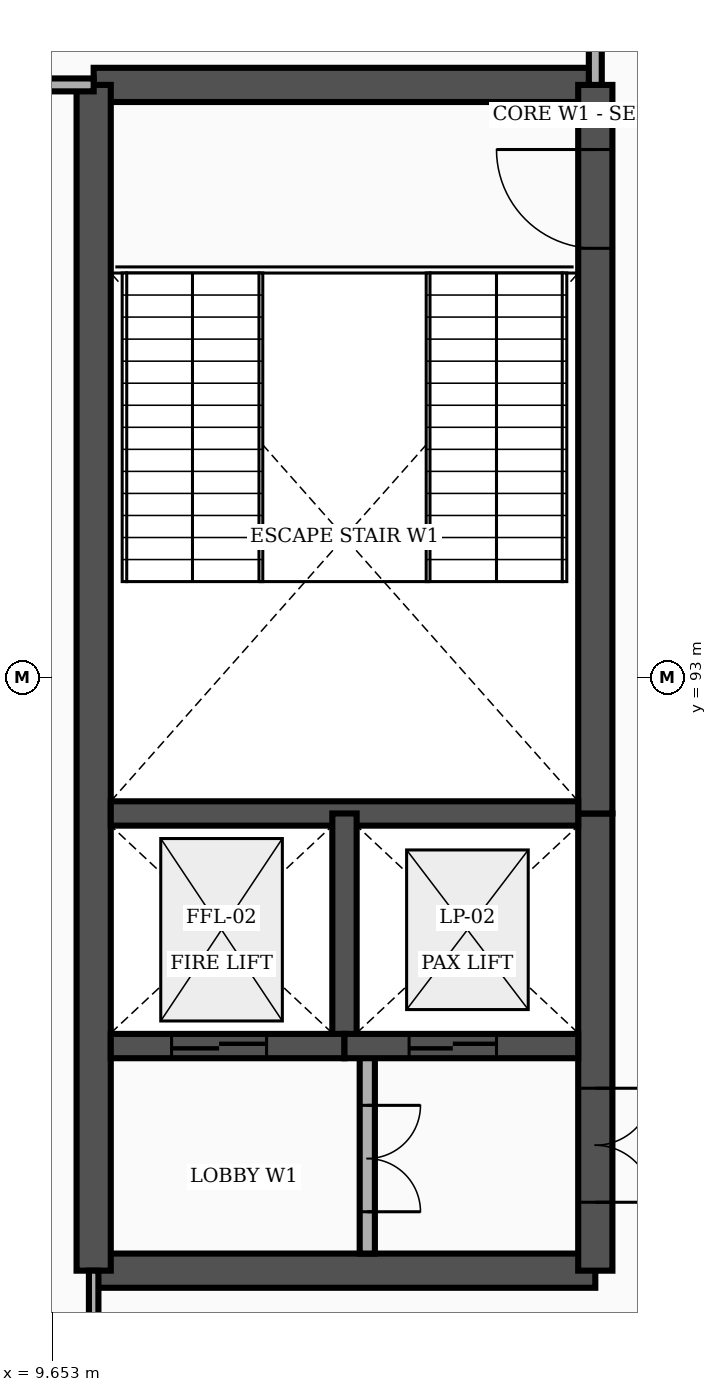
"""IFC4 building model, lengths in metres.
Left out: names, types, materials, properties, quantities, classifications, styles, units other than length and angle.
Written with IfcOpenShell. Run it as: python <this file> out.ifc"""

import sys

from ifc_helpers import new_model, si_unit, direction, frame, frame_2d, origin, place, context, subcontext, project, spatial, rectangle, extrude, element, fill, save


model = new_model("IFC4")
c1 = context("Model", 3, precision=1e-05, world=origin(), true_north=direction((0.0, 1.0)))
c2 = subcontext(c1, "Body", "Model", "MODEL_VIEW")
j1 = project(units=[si_unit("LENGTHUNIT", "METRE"), si_unit("PLANEANGLEUNIT", "RADIAN")], contexts=[c1])
p1 = place(None, origin())
s1 = spatial("IfcSite", under=j1, at=p1, CompositionType="ELEMENT")
p2 = place(p1, origin())
s2 = spatial("IfcBuilding", under=s1, at=p2, CompositionType="ELEMENT")
p3 = place(p2, frame((0.0, 0.0, 16.8)))
s3 = spatial("IfcBuildingStorey", under=s2, at=p3, CompositionType="ELEMENT", Elevation=16.8)
for number, where, z_axis, x_axis in (
    (1, (10.2, 85.2, 0.0), (0.0, 0.0, 1.0), (1.0, 0.0, 0.0)),
    (2, (10.2, 100.8, 0.0), (0.0, 0.0, 1.0), (1.0, 0.0, 0.0)),
):
    element("IfcWall", number, at=place(p3, frame(where, z_axis=z_axis, x_axis=x_axis)), inside=s3, PredefinedType="SHEAR", context=c2, shape_type="SweptSolid", body=[
        extrude(rectangle(XDim=6.6, YDim=0.45, at=frame_2d((3.3, 0.0))), origin(), (0.0, 0.0, 1.0), 4.555),
    ])
p4 = place(p3, frame((10.2, 85.2, 0.0), z_axis=(0.0, 0.0, 1.0), x_axis=(0.0, 1.0, 0.0)))
e3 = element("IfcWall", 3, at=p4, inside=s3, PredefinedType="SHEAR", context=c2, shape_type="SweptSolid", body=[
    extrude(rectangle(XDim=15.6, YDim=0.45, at=frame_2d((7.8, 0.0))), origin(), (0.0, 0.0, 1.0), 4.555),
])
p5 = place(p3, frame((16.8, 85.2, 0.0), z_axis=(0.0, 0.0, 1.0), x_axis=(0.0, 1.0, 0.0)))
e4 = element("IfcWall", 4, at=p5, inside=s3, PredefinedType="SHEAR", context=c2, shape_type="SweptSolid", body=[
    extrude(rectangle(XDim=6.015, YDim=0.45, at=frame_2d((3.008, 0.0))), origin(), (0.0, 0.0, 1.0), 4.555),
])
p6 = place(p5, frame((0.9, 0.0, 0.0)))
e5 = element("IfcOpeningElement", 5, at=p6, cuts=e4, PredefinedType="OPENING", context=c2, shape_type="SweptSolid", body=[
    extrude(rectangle(XDim=1.5, YDim=2.2, at=frame_2d((0.75, 1.1))), frame((0.0, 0.237, 0.0), z_axis=(0.0, -1.0, 0.0), x_axis=(1.0, 0.0, 0.0)), (0.0, 0.0, 1.0), 0.474),
])
p7 = place(p3, frame((16.8, 91.215, 0.0), z_axis=(0.0, 0.0, 1.0), x_axis=(0.0, 1.0, 0.0)))
e6 = element("IfcWall", 6, at=p7, inside=s3, PredefinedType="SHEAR", context=c2, shape_type="SweptSolid", body=[
    extrude(rectangle(XDim=9.585, YDim=0.45, at=frame_2d((4.792, 0.0))), origin(), (0.0, 0.0, 1.0), 4.555),
])
p8 = place(p7, frame((7.435, 0.0, 0.0)))
e7 = element("IfcOpeningElement", 7, at=p8, cuts=e6, PredefinedType="OPENING", context=c2, shape_type="SweptSolid", body=[
    extrude(rectangle(XDim=1.3, YDim=2.2, at=frame_2d((0.65, 1.1))), frame((0.0, 0.237, 0.0), z_axis=(0.0, -1.0, 0.0), x_axis=(1.0, 0.0, 0.0)), (0.0, 0.0, 1.0), 0.474),
])
p9 = place(p3, frame((10.425, 91.215, 0.0), z_axis=(0.0, 0.0, 1.0), x_axis=(1.0, 0.0, 0.0)))
e8 = element("IfcWall", 8, at=p9, inside=s3, PredefinedType="SHEAR", context=c2, shape_type="SweptSolid", body=[
    extrude(rectangle(XDim=6.15, YDim=0.32, at=frame_2d((3.075, 0.0))), origin(), (0.0, 0.0, 1.0), 4.555),
])
p10 = place(p3, frame((13.5, 88.155, 0.0), z_axis=(0.0, 0.0, 1.0), x_axis=(0.0, 1.0, 0.0)))
e9 = element("IfcWall", 9, at=p10, inside=s3, PredefinedType="SHEAR", context=c2, shape_type="SweptSolid", body=[
    extrude(rectangle(XDim=3.06, YDim=0.32, at=frame_2d((1.53, 0.0))), origin(), (0.0, 0.0, 1.0), 4.555),
])
p11 = place(p3, frame((13.8, 85.425, 0.0), z_axis=(0.0, 0.0, 1.0), x_axis=(0.0, 1.0, 0.0)))
e10 = element("IfcWall", 10, at=p11, inside=s3, PredefinedType="PARTITIONING", context=c2, shape_type="SweptSolid", body=[
    extrude(rectangle(XDim=2.73, YDim=0.2, at=frame_2d((1.365, 0.0))), origin(), (0.0, 0.0, 1.0), 4.555),
])
p12 = place(p11, frame((0.55, 0.0, 0.0)))
e11 = element("IfcOpeningElement", 11, at=p12, cuts=e10, PredefinedType="OPENING", context=c2, shape_type="SweptSolid", body=[
    extrude(rectangle(XDim=1.4, YDim=2.25, at=frame_2d((0.7, 1.125))), frame((0.0, 0.112, 0.0), z_axis=(0.0, -1.0, 0.0), x_axis=(1.0, 0.0, 0.0)), (0.0, 0.0, 1.0), 0.224),
])
p13 = place(p3, frame((10.425, 88.155, 0.0), z_axis=(0.0, 0.0, 1.0), x_axis=(1.0, 0.0, 0.0)))
e12 = element("IfcWall", 12, at=p13, inside=s3, PredefinedType="SHEAR", context=c2, shape_type="SweptSolid", body=[
    extrude(rectangle(XDim=3.075, YDim=0.32, at=frame_2d((1.538, 0.0))), origin(), (0.0, 0.0, 1.0), 4.555),
])
p14 = place(p13, frame((0.8, 0.0, 0.0)))
e13 = element("IfcOpeningElement", 13, at=p14, cuts=e12, PredefinedType="OPENING", context=c2, shape_type="SweptSolid", body=[
    extrude(rectangle(XDim=1.25, YDim=2.25, at=frame_2d((0.625, 1.125))), frame((0.0, 0.172, 0.0), z_axis=(0.0, -1.0, 0.0), x_axis=(1.0, 0.0, 0.0)), (0.0, 0.0, 1.0), 0.344),
])
p15 = place(p3, frame((13.5, 88.155, 0.0), z_axis=(0.0, 0.0, 1.0), x_axis=(1.0, 0.0, 0.0)))
e14 = element("IfcWall", 14, at=p15, inside=s3, PredefinedType="SHEAR", context=c2, shape_type="SweptSolid", body=[
    extrude(rectangle(XDim=3.075, YDim=0.32, at=frame_2d((1.538, 0.0))), origin(), (0.0, 0.0, 1.0), 4.555),
])
p16 = place(p15, frame((0.85, 0.0, 0.0)))
e15 = element("IfcOpeningElement", 15, at=p16, cuts=e14, PredefinedType="OPENING", context=c2, shape_type="SweptSolid", body=[
    extrude(rectangle(XDim=1.15, YDim=2.2, at=frame_2d((0.575, 1.1))), frame((0.0, 0.172, 0.0), z_axis=(0.0, -1.0, 0.0), x_axis=(1.0, 0.0, 0.0)), (0.0, 0.0, 1.0), 0.344),
])
p17 = place(p3, frame((10.2, 83.2, 0.0), z_axis=(0.0, 0.0, 1.0), x_axis=(0.0, 1.0, 0.0)))
e16 = element("IfcWall", 16, at=p17, inside=s3, PredefinedType="PARTITIONING", context=c2, shape_type="SweptSolid", body=[
    extrude(rectangle(XDim=2.0, YDim=0.125, at=frame_2d((1.0, 0.0))), origin(), (0.0, 0.0, 1.0), 4.555),
])
p18 = place(p3, frame((0.17, 100.8, 0.0), z_axis=(0.0, 0.0, 1.0), x_axis=(1.0, 0.0, 0.0)))
e17 = element("IfcWall", 17, at=p18, inside=s3, PredefinedType="PARTITIONING", context=c2, shape_type="SweptSolid", body=[
    extrude(rectangle(XDim=10.03, YDim=0.17, at=frame_2d((5.015, 0.0))), origin(), (0.0, 0.0, 1.0), 4.555),
])
p19 = place(p3, frame((16.8, 100.8, 0.0), z_axis=(0.0, 0.0, 1.0), x_axis=(0.0, 1.0, 0.0)))
e18 = element("IfcWall", 18, at=p19, inside=s3, PredefinedType="PARTITIONING", context=c2, shape_type="SweptSolid", body=[
    extrude(rectangle(XDim=19.03, YDim=0.17, at=frame_2d((9.515, 0.0))), origin(), (0.0, 0.0, 1.0), 4.555),
])
p20 = place(p19, frame((3.3, 0.0, 0.0)))
e19 = element("IfcOpeningElement", 19, at=p20, cuts=e18, PredefinedType="OPENING", context=c2, shape_type="SweptSolid", body=[
    extrude(rectangle(XDim=1.15, YDim=2.15, at=frame_2d((0.575, 1.075))), frame((0.0, 0.097, 0.0), z_axis=(0.0, -1.0, 0.0), x_axis=(1.0, 0.0, 0.0)), (0.0, 0.0, 1.0), 0.194),
])
p21 = place(p6, frame((1.5, 0.0, 0.0), z_axis=(0.0, 0.0, 1.0), x_axis=(-1.0, 0.0, 0.0)))
e20 = element("IfcDoor", 20, at=p21, inside=s3, OperationType="DOUBLE_DOOR_SINGLE_SWING", PredefinedType="DOOR", context=c2, shape_type="SweptSolid", body=[
    extrude(rectangle(XDim=1.5, YDim=2.2, at=frame_2d((0.75, 1.1))), frame((0.0, 0.025, 0.0), z_axis=(0.0, -1.0, 0.0), x_axis=(1.0, 0.0, 0.0)), (0.0, 0.0, 1.0), 0.05),
])
fill(e5, e20)
p22 = place(p8, origin())
e21 = element("IfcDoor", 21, at=p22, inside=s3, OperationType="SINGLE_SWING_RIGHT", PredefinedType="DOOR", context=c2, shape_type="SweptSolid", body=[
    extrude(rectangle(XDim=1.3, YDim=2.2, at=frame_2d((0.65, 1.1))), frame((0.0, 0.025, 0.0), z_axis=(0.0, -1.0, 0.0), x_axis=(1.0, 0.0, 0.0)), (0.0, 0.0, 1.0), 0.05),
])
fill(e7, e21)
p23 = place(p12, frame((1.4, 0.0, 0.0), z_axis=(0.0, 0.0, 1.0), x_axis=(-1.0, 0.0, 0.0)))
e22 = element("IfcDoor", 22, at=p23, inside=s3, OperationType="DOUBLE_DOOR_SINGLE_SWING", PredefinedType="DOOR", context=c2, shape_type="SweptSolid", body=[
    extrude(rectangle(XDim=1.4, YDim=2.25, at=frame_2d((0.7, 1.125))), frame((0.0, 0.025, 0.0), z_axis=(0.0, -1.0, 0.0), x_axis=(1.0, 0.0, 0.0)), (0.0, 0.0, 1.0), 0.05),
])
fill(e11, e22)
p24 = place(p14, origin())
e23 = element("IfcDoor", 23, at=p24, inside=s3, OperationType="DOUBLE_DOOR_SLIDING", PredefinedType="DOOR", context=c2, shape_type="SweptSolid", body=[
    extrude(rectangle(XDim=1.25, YDim=2.25, at=frame_2d((0.625, 1.125))), frame((0.0, 0.025, 0.0), z_axis=(0.0, -1.0, 0.0), x_axis=(1.0, 0.0, 0.0)), (0.0, 0.0, 1.0), 0.05),
])
fill(e13, e23)
p25 = place(p16, origin())
e24 = element("IfcDoor", 24, at=p25, inside=s3, OperationType="DOUBLE_DOOR_SLIDING", PredefinedType="DOOR", context=c2, shape_type="SweptSolid", body=[
    extrude(rectangle(XDim=1.15, YDim=2.2, at=frame_2d((0.575, 1.1))), frame((0.0, 0.025, 0.0), z_axis=(0.0, -1.0, 0.0), x_axis=(1.0, 0.0, 0.0)), (0.0, 0.0, 1.0), 0.05),
])
fill(e15, e24)
save(model, sys.argv[1])
